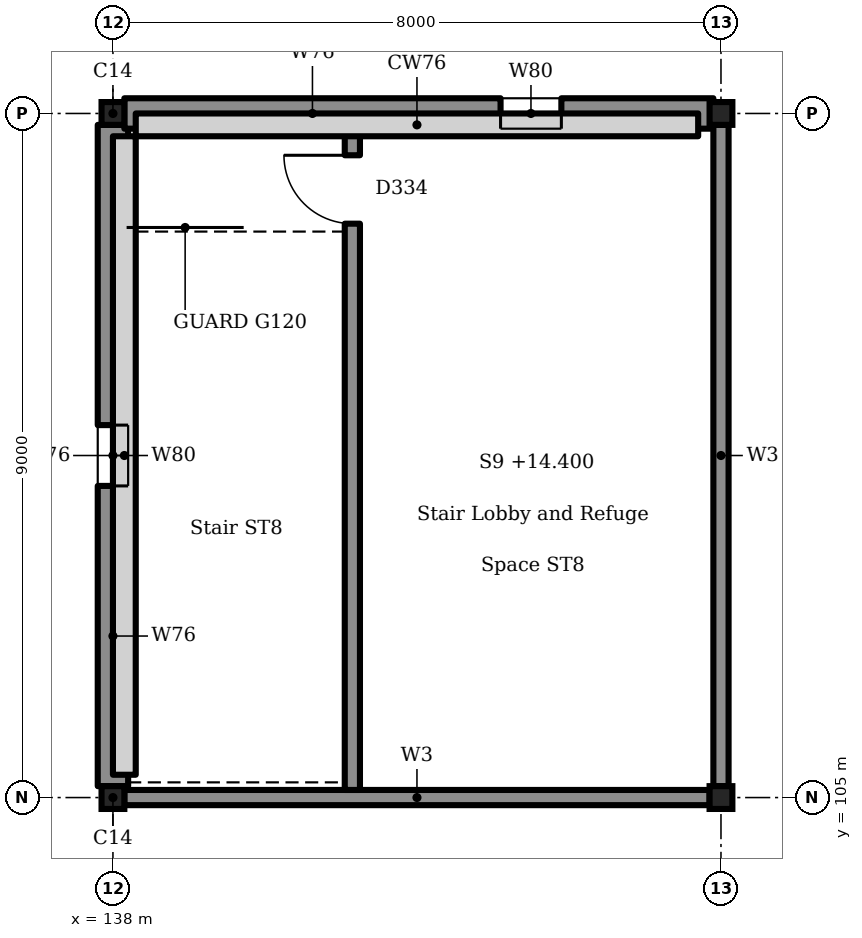
"""IFC4 building model, lengths in metres.
Left out: names, types, materials, properties, quantities, classifications, styles, units other than length and angle.
Written with IfcOpenShell. Run it as: python <this file> out.ifc"""

import sys

from ifc_helpers import new_model, si_unit, direction, frame, frame_2d, origin, origin_2d, place, context, subcontext, project, spatial, polyline, rectangle, i_section, outline, extrude, element, fill, save


model = new_model("IFC4")
c1 = context("Model", 3, precision=1e-05, world=origin(), true_north=direction((0.0, 1.0)))
c2 = subcontext(c1, "Body", "Model", "MODEL_VIEW")
j1 = project(units=[si_unit("LENGTHUNIT", "METRE"), si_unit("PLANEANGLEUNIT", "RADIAN")], contexts=[c1])
p1 = place(None, origin())
s1 = spatial("IfcSite", under=j1, at=p1, CompositionType="ELEMENT")
p2 = place(p1, origin())
s2 = spatial("IfcBuilding", under=s1, at=p2, CompositionType="ELEMENT")
p3 = place(p2, frame((0.0, 0.0, 14.4)))
s3 = spatial("IfcBuildingStorey", under=s2, at=p3, CompositionType="ELEMENT", Elevation=14.4)
for number, where, z_axis, x_axis in (
    (1, (138.0, 105.0, 0.0), (0.0, 0.0, 1.0), (1.0, 0.0, 0.0)),
    (2, (138.0, 114.0, 0.0), (0.0, 0.0, 1.0), (1.0, 0.0, 0.0)),
    (3, (146.0, 105.0, 0.0), (0.0, 0.0, 1.0), (1.0, 0.0, 0.0)),
    (4, (146.0, 114.0, 0.0), (0.0, 0.0, 1.0), (1.0, 0.0, 0.0)),
):
    element("IfcColumn", number, at=place(p3, frame(where, z_axis=z_axis, x_axis=x_axis)), inside=s3, PredefinedType="COLUMN", context=c2, shape_type="SweptSolid", body=[
        extrude(i_section(OverallWidth=0.3, OverallDepth=0.3, WebThickness=0.011, FlangeThickness=0.019, FilletRadius=0.027, at=origin_2d()), origin(), (0.0, 0.0, 1.0), 3.75),
    ])
p4 = place(p3, frame((138.0, 105.15, 0.0), z_axis=(0.0, 0.0, 1.0), x_axis=(0.0, 1.0, 0.0)))
e5 = element("IfcWall", 5, at=p4, inside=s3, PredefinedType="SOLIDWALL", context=c2, shape_type="SweptSolid", body=[
    extrude(rectangle(XDim=8.7, YDim=0.4, at=frame_2d((4.35, 0.0))), origin(), (0.0, 0.0, 1.0), 3.75),
])
p5 = place(p4, frame((3.95, 0.0, 0.9)))
e6 = element("IfcOpeningElement", 6, at=p5, cuts=e5, PredefinedType="OPENING", context=c2, shape_type="SweptSolid", body=[
    extrude(rectangle(XDim=0.8, YDim=1.8, at=frame_2d((0.4, 0.9))), frame((0.0, 0.21, 0.0), z_axis=(0.0, -1.0, 0.0), x_axis=(1.0, 0.0, 0.0)), (0.0, 0.0, 1.0), 0.42),
])
p6 = place(p3, frame((138.15, 114.0, 0.0), z_axis=(0.0, 0.0, 1.0), x_axis=(1.0, 0.0, 0.0)))
e7 = element("IfcWall", 7, at=p6, inside=s3, PredefinedType="SOLIDWALL", context=c2, shape_type="SweptSolid", body=[
    extrude(rectangle(XDim=7.75, YDim=0.4, at=frame_2d((3.875, 0.0))), origin(), (0.0, 0.0, 1.0), 3.75),
])
p7 = place(p6, frame((4.95, 0.0, 0.9)))
e8 = element("IfcOpeningElement", 8, at=p7, cuts=e7, PredefinedType="OPENING", context=c2, shape_type="SweptSolid", body=[
    extrude(rectangle(XDim=0.8, YDim=1.8, at=frame_2d((0.4, 0.9))), frame((0.0, 0.21, 0.0), z_axis=(0.0, -1.0, 0.0), x_axis=(1.0, 0.0, 0.0)), (0.0, 0.0, 1.0), 0.42),
])
p8 = place(p2, frame((0.0, 0.0, 9.9)))
s4 = spatial("IfcBuildingStorey", under=s2, at=p8, CompositionType="ELEMENT", Elevation=9.9)
p9 = place(p8, frame((146.15, 114.212, 2.85), z_axis=(0.0, 0.0, 1.0), x_axis=(1.0, 0.0, 0.0)))
e9 = element("IfcWall", 9, at=p9, inside=s4, PredefinedType="SOLIDWALL", context=c2, shape_type="SweptSolid", body=[
    extrude(rectangle(XDim=3.85, YDim=0.225, at=frame_2d((1.925, 0.0))), origin(), (0.0, 0.0, 1.0), 4.65),
])
p10 = place(p8, frame((146.0, 95.9, 0.0), z_axis=(0.0, 0.0, 1.0), x_axis=(0.0, 1.0, 0.0)))
e10 = element("IfcWall", 10, at=p10, inside=s4, PredefinedType="SOLIDWALL", context=c2, shape_type="SweptSolid", body=[
    extrude(rectangle(XDim=8.95, YDim=0.3, at=frame_2d((4.475, 0.0))), origin(), (0.0, 0.0, 1.0), 6.05),
])
p11 = place(p3, frame((146.0, 105.15, 0.0), z_axis=(0.0, 0.0, 1.0), x_axis=(0.0, 1.0, 0.0)))
e11 = element("IfcWall", 11, at=p11, inside=s3, PredefinedType="SOLIDWALL", context=c2, shape_type="SweptSolid", body=[
    extrude(rectangle(XDim=8.7, YDim=0.2, at=frame_2d((4.35, 0.0))), origin(), (0.0, 0.0, 1.0), 3.75),
])
p12 = place(p3, frame((138.15, 105.0, 0.0), z_axis=(0.0, 0.0, 1.0), x_axis=(1.0, 0.0, 0.0)))
e12 = element("IfcWall", 12, at=p12, inside=s3, PredefinedType="SOLIDWALL", context=c2, shape_type="SweptSolid", body=[
    extrude(rectangle(XDim=7.7, YDim=0.2, at=frame_2d((3.85, 0.0))), origin(), (0.0, 0.0, 1.0), 3.75),
])
p13 = place(p3, frame((141.15, 105.1, 0.0), z_axis=(0.0, 0.0, 1.0), x_axis=(0.0, 1.0, 0.0)))
e13 = element("IfcWall", 13, at=p13, inside=s3, PredefinedType="SOLIDWALL", context=c2, shape_type="SweptSolid", body=[
    extrude(rectangle(XDim=8.7, YDim=0.2, at=frame_2d((4.35, 0.0))), origin(), (0.0, 0.0, 1.0), 3.75),
])
p14 = place(p13, frame((7.45, 0.0, 0.0)))
e14 = element("IfcOpeningElement", 14, at=p14, cuts=e13, PredefinedType="OPENING", context=c2, shape_type="SweptSolid", body=[
    extrude(rectangle(XDim=0.9, YDim=2.1, at=frame_2d((0.45, 1.05))), frame((0.0, 0.11, 0.0), z_axis=(0.0, -1.0, 0.0), x_axis=(1.0, 0.0, 0.0)), (0.0, 0.0, 1.0), 0.22),
])
p15 = place(p3, frame((138.15, 105.3, 4.0), z_axis=(0.0, 0.0, 1.0), x_axis=(0.0, 1.0, 0.0)))
e15 = element("IfcWall", 15, at=p15, inside=s3, PredefinedType="PARAPET", context=c2, shape_type="SweptSolid", body=[
    extrude(outline(polyline([(0.0, 0.0), (8.4, 0.0), (8.4, 0.55), (8.1, 0.557), (7.8, 0.577), (7.5, 0.606), (7.2, 0.683), (6.9, 0.812), (6.6, 0.973), (6.3, 1.146), (6.0, 1.317), (5.7, 1.471), (5.4, 1.696), (5.1, 1.951), (4.8, 2.17), (4.5, 2.328), (4.2, 2.4), (3.9, 2.328), (3.6, 2.17), (3.3, 1.951), (3.0, 1.696), (2.7, 1.471), (2.4, 1.317), (2.1, 1.146), (1.8, 0.973), (1.5, 0.812), (1.2, 0.683), (0.9, 0.606), (0.6, 0.577), (0.3, 0.557), (0.0, 0.55), (0.0, 0.0)])), frame((0.0, 0.15, 0.0), z_axis=(0.0, -1.0, 0.0), x_axis=(1.0, 0.0, 0.0)), (0.0, 0.0, 1.0), 0.3),
])
p16 = place(p3, frame((138.3, 113.85, 4.0), z_axis=(0.0, 0.0, 1.0), x_axis=(1.0, 0.0, 0.0)))
e16 = element("IfcWall", 16, at=p16, inside=s3, PredefinedType="PARAPET", context=c2, shape_type="SweptSolid", body=[
    extrude(outline(polyline([(0.0, 0.0), (7.4, 0.0), (7.4, 0.55), (7.104, 0.559), (6.808, 0.583), (6.512, 0.626), (6.216, 0.74), (5.92, 0.906), (5.624, 1.098), (5.328, 1.29), (5.032, 1.465), (4.736, 1.717), (4.44, 1.999), (4.144, 2.229), (3.848, 2.372), (3.552, 2.372), (3.256, 2.229), (2.96, 1.999), (2.664, 1.717), (2.368, 1.465), (2.072, 1.29), (1.776, 1.098), (1.48, 0.906), (1.184, 0.74), (0.888, 0.626), (0.592, 0.583), (0.296, 0.559), (0.0, 0.55), (0.0, 0.0)])), frame((0.0, 0.15, 0.0), z_axis=(0.0, -1.0, 0.0), x_axis=(1.0, 0.0, 0.0)), (0.0, 0.0, 1.0), 0.3),
])
p17 = place(p7, origin())
e17 = element("IfcWindow", 17, at=p17, inside=s3, PartitioningType="SINGLE_PANEL", PredefinedType="WINDOW", context=c2, shape_type="SweptSolid", body=[
    extrude(rectangle(XDim=0.8, YDim=1.8, at=frame_2d((0.4, 0.9))), frame((0.0, 0.03, 0.0), z_axis=(0.0, -1.0, 0.0), x_axis=(1.0, 0.0, 0.0)), (0.0, 0.0, 1.0), 0.06),
])
fill(e8, e17)
p18 = place(p5, origin())
e18 = element("IfcWindow", 18, at=p18, inside=s3, PartitioningType="SINGLE_PANEL", PredefinedType="WINDOW", context=c2, shape_type="SweptSolid", body=[
    extrude(rectangle(XDim=0.8, YDim=1.8, at=frame_2d((0.4, 0.9))), frame((0.0, 0.03, 0.0), z_axis=(0.0, -1.0, 0.0), x_axis=(1.0, 0.0, 0.0)), (0.0, 0.0, 1.0), 0.06),
])
fill(e6, e18)
p19 = place(p14, origin())
e19 = element("IfcDoor", 19, at=p19, inside=s3, OperationType="SINGLE_SWING_LEFT", PredefinedType="DOOR", context=c2, shape_type="SweptSolid", body=[
    extrude(rectangle(XDim=0.9, YDim=2.1, at=frame_2d((0.45, 1.05))), frame((0.0, 0.025, 0.0), z_axis=(0.0, -1.0, 0.0), x_axis=(1.0, 0.0, 0.0)), (0.0, 0.0, 1.0), 0.05),
])
fill(e14, e19)
save(model, sys.argv[1])
